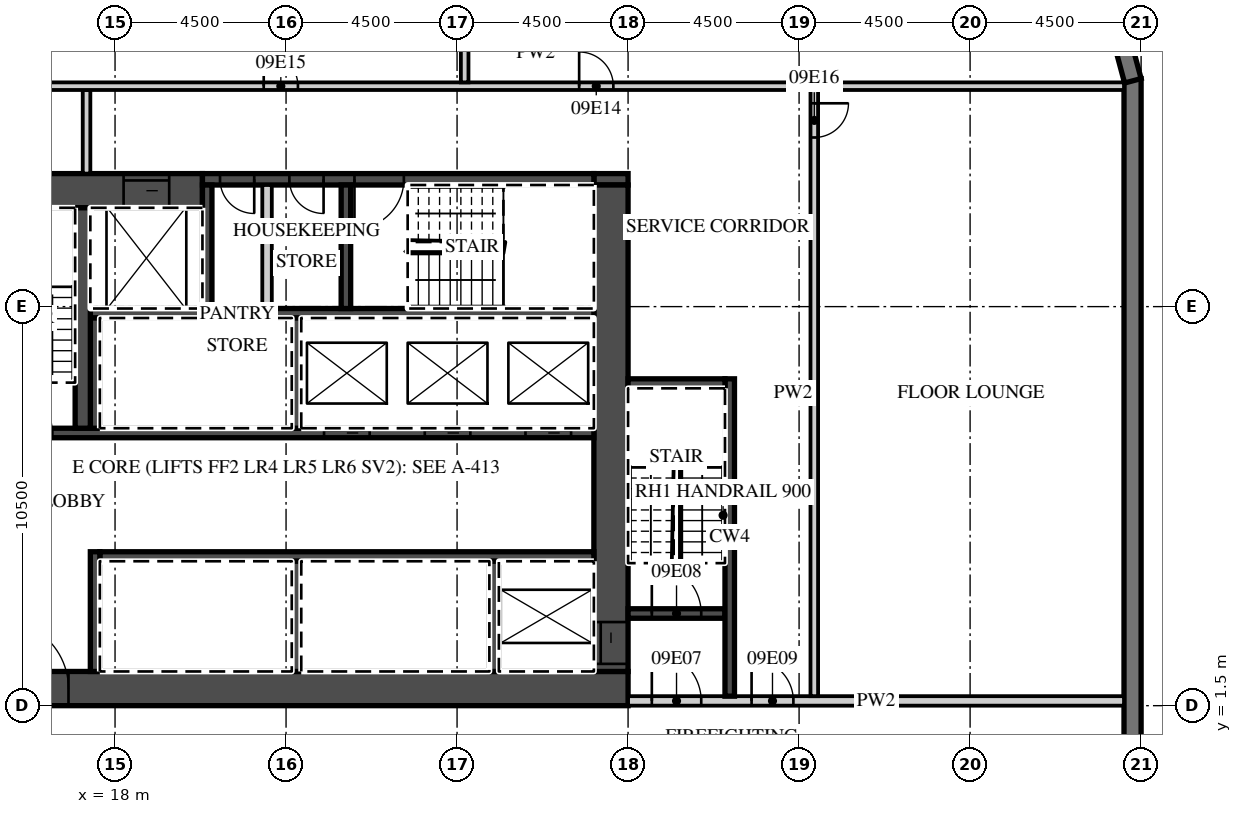
"""IFC4 building model, lengths in metres.
Left out: names, types, materials, properties, quantities, classifications, styles, units other than length and angle.
Written with IfcOpenShell. Run it as: python <this file> out.ifc"""

import sys

from ifc_helpers import new_model, si_unit, direction, frame, frame_2d, origin, place, context, subcontext, project, spatial, polyline, rectangle, outline, extrude, element, fill, save


model = new_model("IFC4")
c1 = context("Model", 3, precision=1e-05, world=origin(), true_north=direction((0.0, 1.0)))
c2 = subcontext(c1, "Body", "Model", "MODEL_VIEW")
j1 = project(units=[si_unit("LENGTHUNIT", "METRE"), si_unit("PLANEANGLEUNIT", "RADIAN")], contexts=[c1])
p1 = place(None, origin())
s1 = spatial("IfcSite", under=j1, at=p1, CompositionType="ELEMENT")
p2 = place(p1, origin())
s2 = spatial("IfcBuilding", under=s1, at=p2, CompositionType="ELEMENT")
p3 = place(p2, frame((0.0, 0.0, 60.0)))
s3 = spatial("IfcBuildingStorey", under=s2, at=p3, CompositionType="ELEMENT", Elevation=60.0)
p4 = place(p3, frame((44.775, -18.0, 0.0), z_axis=(0.0, 0.0, 1.0), x_axis=(0.0, 1.0, 0.0)))
e1 = element("IfcWall", 1, at=p4, inside=s3, PredefinedType="SOLIDWALL", context=c2, shape_type="SweptSolid", body=[
    extrude(rectangle(XDim=36.0, YDim=0.45, at=frame_2d((18.0, 0.0))), origin(), (0.0, 0.0, 1.0), 3.02),
])
p5 = place(p4, frame((3.9, 0.0, 0.45)))
e2 = element("IfcOpeningElement", 2, at=p5, cuts=e1, PredefinedType="OPENING", context=c2, shape_type="SweptSolid", body=[
    extrude(rectangle(XDim=3.3, YDim=2.25, at=frame_2d((1.65, 1.125))), frame((0.0, 0.235, 0.0), z_axis=(0.0, -1.0, 0.0), x_axis=(1.0, 0.0, 0.0)), (0.0, 0.0, 1.0), 0.47),
])
p6 = place(p4, frame((8.4, 0.0, 0.45)))
e3 = element("IfcOpeningElement", 3, at=p6, cuts=e1, PredefinedType="OPENING", context=c2, shape_type="SweptSolid", body=[
    extrude(rectangle(XDim=3.3, YDim=2.25, at=frame_2d((1.65, 1.125))), frame((0.0, 0.235, 0.0), z_axis=(0.0, -1.0, 0.0), x_axis=(1.0, 0.0, 0.0)), (0.0, 0.0, 1.0), 0.47),
])
p7 = place(p4, frame((12.9, 0.0, 0.45)))
e4 = element("IfcOpeningElement", 4, at=p7, cuts=e1, PredefinedType="OPENING", context=c2, shape_type="SweptSolid", body=[
    extrude(rectangle(XDim=3.3, YDim=2.25, at=frame_2d((1.65, 1.125))), frame((0.0, 0.235, 0.0), z_axis=(0.0, -1.0, 0.0), x_axis=(1.0, 0.0, 0.0)), (0.0, 0.0, 1.0), 0.47),
])
p8 = place(p3, frame((44.783, 17.942, 0.0), z_axis=(0.0, 0.0, 1.0), x_axis=(-0.25881466832, 0.965926999034, 0.0)))
e5 = element("IfcWall", 5, at=p8, inside=s3, PredefinedType="SOLIDWALL", context=c2, shape_type="SweptSolid", body=[
    extrude(outline(polyline([(0.0, -0.225), (2.071, -0.225), (1.95, 0.225), (0.121, 0.225), (0.0, -0.225)])), origin(), (0.0, 0.0, 1.0), 3.02),
])
p9 = place(p3, frame((13.5, 1.95, 0.0), z_axis=(0.0, 0.0, 1.0), x_axis=(1.0, 0.0, 0.0)))
e6 = element("IfcWall", 6, at=p9, inside=s3, PredefinedType="SHEAR", context=c2, shape_type="SweptSolid", body=[
    extrude(rectangle(XDim=18.0, YDim=0.9, at=frame_2d((9.0, 0.0))), origin(), (0.0, 0.0, 1.0), 3.02),
])
p10 = place(p9, frame((1.475, 0.0, 0.0)))
e7 = element("IfcOpeningElement", 7, at=p10, cuts=e6, PredefinedType="OPENING", context=c2, shape_type="SweptSolid", body=[
    extrude(rectangle(XDim=1.8, YDim=2.1, at=frame_2d((0.9, 1.05))), frame((0.0, 0.46, 0.0), z_axis=(0.0, -1.0, 0.0), x_axis=(1.0, 0.0, 0.0)), (0.0, 0.0, 1.0), 0.92),
])
p11 = place(p3, frame((13.5, 15.05, 0.0), z_axis=(0.0, 0.0, 1.0), x_axis=(1.0, 0.0, 0.0)))
e8 = element("IfcWall", 8, at=p11, inside=s3, PredefinedType="SHEAR", context=c2, shape_type="SweptSolid", body=[
    extrude(rectangle(XDim=6.8, YDim=0.9, at=frame_2d((3.4, 0.0))), origin(), (0.0, 0.0, 1.0), 3.02),
])
p12 = place(p11, frame((4.725, 0.0, 0.0)))
e9 = element("IfcOpeningElement", 9, at=p12, cuts=e8, PredefinedType="OPENING", context=c2, shape_type="SweptSolid", body=[
    extrude(rectangle(XDim=1.2, YDim=2.1, at=frame_2d((0.6, 1.05))), frame((0.0, 0.46, 0.0), z_axis=(0.0, -1.0, 0.0), x_axis=(1.0, 0.0, 0.0)), (0.0, 0.0, 1.0), 0.92),
])
p13 = place(p3, frame((30.6, 15.35, 0.0), z_axis=(0.0, 0.0, 1.0), x_axis=(1.0, 0.0, 0.0)))
e10 = element("IfcWall", 10, at=p13, inside=s3, PredefinedType="SHEAR", context=c2, shape_type="SweptSolid", body=[
    extrude(rectangle(XDim=0.9, YDim=0.3, at=frame_2d((0.45, 0.0))), origin(), (0.0, 0.0, 1.0), 3.02),
])
p14 = place(p3, frame((20.3, 15.35, 0.0), z_axis=(0.0, 0.0, 1.0), x_axis=(1.0, 0.0, 0.0)))
e11 = element("IfcWall", 11, at=p14, inside=s3, PredefinedType="SHEAR", context=c2, shape_type="SweptSolid", body=[
    extrude(rectangle(XDim=10.3, YDim=0.3, at=frame_2d((5.15, 0.0))), origin(), (0.0, 0.0, 1.0), 3.02),
])
p15 = place(p14, frame((4.0, 0.0, 0.0)))
e12 = element("IfcOpeningElement", 12, at=p15, cuts=e11, PredefinedType="OPENING", context=c2, shape_type="SweptSolid", body=[
    extrude(rectangle(XDim=1.3, YDim=2.1, at=frame_2d((0.65, 1.05))), frame((0.0, 0.16, 0.0), z_axis=(0.0, -1.0, 0.0), x_axis=(1.0, 0.0, 0.0)), (0.0, 0.0, 1.0), 0.32),
])
p16 = place(p14, frame((2.288, 0.0, 0.0)))
e13 = element("IfcOpeningElement", 13, at=p16, cuts=e11, PredefinedType="OPENING", context=c2, shape_type="SweptSolid", body=[
    extrude(rectangle(XDim=0.9, YDim=2.1, at=frame_2d((0.45, 1.05))), frame((0.0, 0.16, 0.0), z_axis=(0.0, -1.0, 0.0), x_axis=(1.0, 0.0, 0.0)), (0.0, 0.0, 1.0), 0.32),
])
p17 = place(p14, frame((0.462, 0.0, 0.0)))
e14 = element("IfcOpeningElement", 14, at=p17, cuts=e11, PredefinedType="OPENING", context=c2, shape_type="SweptSolid", body=[
    extrude(rectangle(XDim=0.9, YDim=2.1, at=frame_2d((0.45, 1.05))), frame((0.0, 0.16, 0.0), z_axis=(0.0, -1.0, 0.0), x_axis=(1.0, 0.0, 0.0)), (0.0, 0.0, 1.0), 0.32),
])
p18 = place(p3, frame((31.05, 2.4, 0.0), z_axis=(0.0, 0.0, 1.0), x_axis=(0.0, 1.0, 0.0)))
e15 = element("IfcWall", 15, at=p18, inside=s3, PredefinedType="SHEAR", context=c2, shape_type="SweptSolid", body=[
    extrude(rectangle(XDim=12.8, YDim=0.9, at=frame_2d((6.4, 0.0))), origin(), (0.0, 0.0, 1.0), 3.02),
])
p19 = place(p18, frame((0.2, 0.0, 0.0)))
e16 = element("IfcOpeningElement", 16, at=p19, cuts=e15, PredefinedType="OPENING", context=c2, shape_type="SweptSolid", body=[
    extrude(rectangle(XDim=1.1, YDim=2.1, at=frame_2d((0.55, 1.05))), frame((0.0, 0.46, 0.0), z_axis=(0.0, -1.0, 0.0), x_axis=(1.0, 0.0, 0.0)), (0.0, 0.0, 1.0), 0.92),
])
p20 = place(p3, frame((17.6, 5.425, 0.0), z_axis=(0.0, 0.0, 1.0), x_axis=(1.0, 0.0, 0.0)))
e17 = element("IfcWall", 17, at=p20, inside=s3, PredefinedType="SHEAR", context=c2, shape_type="SweptSolid", body=[
    extrude(rectangle(XDim=13.0, YDim=0.25, at=frame_2d((6.5, 0.0))), origin(), (0.0, 0.0, 1.0), 3.02),
])
p21 = place(p3, frame((17.475, 2.4, 0.0), z_axis=(0.0, 0.0, 1.0), x_axis=(0.0, 1.0, 0.0)))
e18 = element("IfcWall", 18, at=p21, inside=s3, PredefinedType="SHEAR", context=c2, shape_type="SweptSolid", body=[
    extrude(rectangle(XDim=3.15, YDim=0.25, at=frame_2d((1.575, 0.0))), origin(), (0.0, 0.0, 1.0), 3.02),
])
for number, where, z_axis, x_axis in (
    (19, (27.975, 2.4, 0.0), (0.0, 0.0, 1.0), (0.0, 1.0, 0.0)),
    (20, (22.775, 2.4, 0.0), (0.0, 0.0, 1.0), (0.0, 1.0, 0.0)),
):
    element("IfcWall", number, at=place(p3, frame(where, z_axis=z_axis, x_axis=x_axis)), inside=s3, PredefinedType="SHEAR", context=c2, shape_type="SweptSolid", body=[
        extrude(rectangle(XDim=2.9, YDim=0.25, at=frame_2d((1.45, 0.0))), origin(), (0.0, 0.0, 1.0), 3.02),
    ])
p22 = place(p3, frame((14.4, 8.675, 0.0), z_axis=(0.0, 0.0, 1.0), x_axis=(1.0, 0.0, 0.0)))
e21 = element("IfcWall", 21, at=p22, inside=s3, PredefinedType="SHEAR", context=c2, shape_type="SweptSolid", body=[
    extrude(rectangle(XDim=16.2, YDim=0.25, at=frame_2d((8.1, 0.0))), origin(), (0.0, 0.0, 1.0), 3.02),
])
p23 = place(p22, frame((14.4, 0.0, 0.0)))
e22 = element("IfcOpeningElement", 22, at=p23, cuts=e21, PredefinedType="OPENING", context=c2, shape_type="SweptSolid", body=[
    extrude(rectangle(XDim=1.2, YDim=2.1, at=frame_2d((0.6, 1.05))), frame((0.0, 0.135, 0.0), z_axis=(0.0, -1.0, 0.0), x_axis=(1.0, 0.0, 0.0)), (0.0, 0.0, 1.0), 0.27),
])
p24 = place(p22, frame((11.75, 0.0, 0.0)))
e23 = element("IfcOpeningElement", 23, at=p24, cuts=e21, PredefinedType="OPENING", context=c2, shape_type="SweptSolid", body=[
    extrude(rectangle(XDim=1.2, YDim=2.1, at=frame_2d((0.6, 1.05))), frame((0.0, 0.135, 0.0), z_axis=(0.0, -1.0, 0.0), x_axis=(1.0, 0.0, 0.0)), (0.0, 0.0, 1.0), 0.27),
])
p25 = place(p22, frame((9.1, 0.0, 0.0)))
e24 = element("IfcOpeningElement", 24, at=p25, cuts=e21, PredefinedType="OPENING", context=c2, shape_type="SweptSolid", body=[
    extrude(rectangle(XDim=1.2, YDim=2.1, at=frame_2d((0.6, 1.05))), frame((0.0, 0.135, 0.0), z_axis=(0.0, -1.0, 0.0), x_axis=(1.0, 0.0, 0.0)), (0.0, 0.0, 1.0), 0.27),
])
p26 = place(p22, frame((0.65, 0.0, 0.0)))
e25 = element("IfcOpeningElement", 25, at=p26, cuts=e21, PredefinedType="OPENING", context=c2, shape_type="SweptSolid", body=[
    extrude(rectangle(XDim=1.3, YDim=2.1, at=frame_2d((0.65, 1.05))), frame((0.0, 0.135, 0.0), z_axis=(0.0, -1.0, 0.0), x_axis=(1.0, 0.0, 0.0)), (0.0, 0.0, 1.0), 0.27),
])
p27 = place(p3, frame((17.35, 11.825, 0.0), z_axis=(0.0, 0.0, 1.0), x_axis=(1.0, 0.0, 0.0)))
e26 = element("IfcWall", 26, at=p27, inside=s3, PredefinedType="SHEAR", context=c2, shape_type="SweptSolid", body=[
    extrude(rectangle(XDim=13.25, YDim=0.25, at=frame_2d((6.625, 0.0))), origin(), (0.0, 0.0, 1.0), 3.02),
])
for number, where, z_axis, x_axis in (
    (27, (17.475, 8.8, 0.0), (0.0, 0.0, 1.0), (0.0, 1.0, 0.0)),
    (28, (22.775, 8.8, 0.0), (0.0, 0.0, 1.0), (0.0, 1.0, 0.0)),
):
    element("IfcWall", number, at=place(p3, frame(where, z_axis=z_axis, x_axis=x_axis)), inside=s3, PredefinedType="SHEAR", context=c2, shape_type="SweptSolid", body=[
        extrude(rectangle(XDim=2.9, YDim=0.25, at=frame_2d((1.45, 0.0))), origin(), (0.0, 0.0, 1.0), 3.02),
    ])
p28 = place(p3, frame((17.15, 8.8, 0.0), z_axis=(0.0, 0.0, 1.0), x_axis=(0.0, 1.0, 0.0)))
e29 = element("IfcWall", 29, at=p28, inside=s3, PredefinedType="SHEAR", context=c2, shape_type="SweptSolid", body=[
    extrude(rectangle(XDim=5.8, YDim=0.4, at=frame_2d((2.9, 0.0))), origin(), (0.0, 0.0, 1.0), 3.02),
])
for number, where, z_axis, x_axis in (
    (30, (20.425, 11.95, 0.0), (0.0, 0.0, 1.0), (0.0, 1.0, 0.0)),
    (31, (24.075, 11.95, 0.0), (0.0, 0.0, 1.0), (0.0, 1.0, 0.0)),
):
    element("IfcWall", number, at=place(p3, frame(where, z_axis=z_axis, x_axis=x_axis)), inside=s3, PredefinedType="SHEAR", context=c2, shape_type="SweptSolid", body=[
        extrude(rectangle(XDim=3.25, YDim=0.25, at=frame_2d((1.625, 0.0))), origin(), (0.0, 0.0, 1.0), 3.02),
    ])
p29 = place(p3, frame((22.0, 11.95, 0.0), z_axis=(0.0, 0.0, 1.0), x_axis=(0.0, 1.0, 0.0)))
e32 = element("IfcWall", 32, at=p29, inside=s3, PredefinedType="PARTITIONING", context=c2, shape_type="SweptSolid", body=[
    extrude(rectangle(XDim=3.25, YDim=0.25, at=frame_2d((1.625, 0.0))), origin(), (0.0, 0.0, 1.0), 3.02),
])
p30 = place(p3, frame((31.5, 1.625, 0.0), z_axis=(0.0, 0.0, 1.0), x_axis=(1.0, 0.0, 0.0)))
e33 = element("IfcWall", 33, at=p30, inside=s3, PredefinedType="PARTITIONING", context=c2, shape_type="SweptSolid", body=[
    extrude(rectangle(XDim=13.05, YDim=0.25, at=frame_2d((6.525, 0.0))), origin(), (0.0, 0.0, 1.0), 3.02),
])
p31 = place(p30, frame((0.625, 0.0, 0.0)))
e34 = element("IfcOpeningElement", 34, at=p31, cuts=e33, PredefinedType="OPENING", context=c2, shape_type="SweptSolid", body=[
    extrude(rectangle(XDim=1.3, YDim=2.1, at=frame_2d((0.65, 1.05))), frame((0.0, 0.135, 0.0), z_axis=(0.0, -1.0, 0.0), x_axis=(1.0, 0.0, 0.0)), (0.0, 0.0, 1.0), 0.27),
])
p32 = place(p30, frame((3.25, 0.0, 0.0)))
e35 = element("IfcOpeningElement", 35, at=p32, cuts=e33, PredefinedType="OPENING", context=c2, shape_type="SweptSolid", body=[
    extrude(rectangle(XDim=1.1, YDim=2.1, at=frame_2d((0.55, 1.05))), frame((0.0, 0.135, 0.0), z_axis=(0.0, -1.0, 0.0), x_axis=(1.0, 0.0, 0.0)), (0.0, 0.0, 1.0), 0.27),
])
p33 = place(p3, frame((31.5, 3.925, 0.0), z_axis=(0.0, 0.0, 1.0), x_axis=(1.0, 0.0, 0.0)))
e36 = element("IfcWall", 36, at=p33, inside=s3, PredefinedType="SHEAR", context=c2, shape_type="SweptSolid", body=[
    extrude(rectangle(XDim=2.55, YDim=0.25, at=frame_2d((1.275, 0.0))), origin(), (0.0, 0.0, 1.0), 3.02),
])
p34 = place(p33, frame((0.625, 0.0, 0.0)))
e37 = element("IfcOpeningElement", 37, at=p34, cuts=e36, PredefinedType="OPENING", context=c2, shape_type="SweptSolid", body=[
    extrude(rectangle(XDim=1.3, YDim=2.1, at=frame_2d((0.65, 1.05))), frame((0.0, 0.135, 0.0), z_axis=(0.0, -1.0, 0.0), x_axis=(1.0, 0.0, 0.0)), (0.0, 0.0, 1.0), 0.27),
])
p35 = place(p3, frame((34.175, 1.75, 0.0), z_axis=(0.0, 0.0, 1.0), x_axis=(0.0, 1.0, 0.0)))
e38 = element("IfcWall", 38, at=p35, inside=s3, PredefinedType="SHEAR", context=c2, shape_type="SweptSolid", body=[
    extrude(rectangle(XDim=8.35, YDim=0.25, at=frame_2d((4.175, 0.0))), origin(), (0.0, 0.0, 1.0), 3.02),
])
p36 = place(p3, frame((31.5, 9.975, 0.0), z_axis=(0.0, 0.0, 1.0), x_axis=(1.0, 0.0, 0.0)))
e39 = element("IfcWall", 39, at=p36, inside=s3, PredefinedType="SHEAR", context=c2, shape_type="SweptSolid", body=[
    extrude(rectangle(XDim=2.55, YDim=0.25, at=frame_2d((1.275, 0.0))), origin(), (0.0, 0.0, 1.0), 3.02),
])
p37 = place(p3, frame((17.25, 15.5, 0.0), z_axis=(0.0, 0.0, 1.0), x_axis=(0.0, 1.0, 0.0)))
e40 = element("IfcWall", 40, at=p37, inside=s3, PredefinedType="PARTITIONING", context=c2, shape_type="SweptSolid", body=[
    extrude(rectangle(XDim=2.2, YDim=0.2, at=frame_2d((1.1, 0.0))), origin(), (0.0, 0.0, 1.0), 3.02),
])
p38 = place(p3, frame((36.4, 1.75, 0.0), z_axis=(0.0, 0.0, 1.0), x_axis=(0.0, 1.0, 0.0)))
e41 = element("IfcWall", 41, at=p38, inside=s3, PredefinedType="PARTITIONING", context=c2, shape_type="SweptSolid", body=[
    extrude(rectangle(XDim=15.95, YDim=0.2, at=frame_2d((7.975, 0.0))), origin(), (0.0, 0.0, 1.0), 3.02),
])
p39 = place(p38, frame((14.7, 0.0, 0.0)))
e42 = element("IfcOpeningElement", 42, at=p39, cuts=e41, PredefinedType="OPENING", context=c2, shape_type="SweptSolid", body=[
    extrude(rectangle(XDim=0.9, YDim=2.1, at=frame_2d((0.45, 1.05))), frame((0.0, 0.11, 0.0), z_axis=(0.0, -1.0, 0.0), x_axis=(1.0, 0.0, 0.0)), (0.0, 0.0, 1.0), 0.22),
])
p40 = place(p3, frame((13.6, 17.8, 0.0), z_axis=(0.0, 0.0, 1.0), x_axis=(1.0, 0.0, 0.0)))
e43 = element("IfcWall", 43, at=p40, inside=s3, PredefinedType="PARTITIONING", context=c2, shape_type="SweptSolid", body=[
    extrude(rectangle(XDim=30.95, YDim=0.2, at=frame_2d((15.475, 0.0))), origin(), (0.0, 0.0, 1.0), 3.02),
])
p41 = place(p40, frame((16.613, 0.0, 0.0)))
e44 = element("IfcOpeningElement", 44, at=p41, cuts=e43, PredefinedType="OPENING", context=c2, shape_type="SweptSolid", body=[
    extrude(rectangle(XDim=0.9, YDim=2.1, at=frame_2d((0.45, 1.05))), frame((0.0, 0.11, 0.0), z_axis=(0.0, -1.0, 0.0), x_axis=(1.0, 0.0, 0.0)), (0.0, 0.0, 1.0), 0.22),
])
p42 = place(p40, frame((8.312, 0.0, 0.0)))
e45 = element("IfcOpeningElement", 45, at=p42, cuts=e43, PredefinedType="OPENING", context=c2, shape_type="SweptSolid", body=[
    extrude(rectangle(XDim=0.9, YDim=2.1, at=frame_2d((0.45, 1.05))), frame((0.0, 0.11, 0.0), z_axis=(0.0, -1.0, 0.0), x_axis=(1.0, 0.0, 0.0)), (0.0, 0.0, 1.0), 0.22),
])
p43 = place(p3, frame((27.2, 17.9, 0.0), z_axis=(0.0, 0.0, 1.0), x_axis=(0.0, 1.0, 0.0)))
e46 = element("IfcWall", 46, at=p43, inside=s3, PredefinedType="PARTITIONING", context=c2, shape_type="SweptSolid", body=[
    extrude(rectangle(XDim=3.65, YDim=0.2, at=frame_2d((1.825, 0.0))), origin(), (0.0, 0.0, 1.0), 3.02),
])
p44 = place(p23, origin())
e47 = element("IfcDoor", 47, at=p44, inside=s3, OperationType="SLIDING_TO_LEFT", PredefinedType="DOOR", context=c2, shape_type="SweptSolid", body=[
    extrude(rectangle(XDim=1.2, YDim=2.1, at=frame_2d((0.6, 1.05))), frame((0.0, 0.025, 0.0), z_axis=(0.0, -1.0, 0.0), x_axis=(1.0, 0.0, 0.0)), (0.0, 0.0, 1.0), 0.05),
])
fill(e22, e47)
p45 = place(p24, origin())
e48 = element("IfcDoor", 48, at=p45, inside=s3, OperationType="SLIDING_TO_RIGHT", PredefinedType="DOOR", context=c2, shape_type="SweptSolid", body=[
    extrude(rectangle(XDim=1.2, YDim=2.1, at=frame_2d((0.6, 1.05))), frame((0.0, 0.025, 0.0), z_axis=(0.0, -1.0, 0.0), x_axis=(1.0, 0.0, 0.0)), (0.0, 0.0, 1.0), 0.05),
])
fill(e23, e48)
p46 = place(p25, origin())
e49 = element("IfcDoor", 49, at=p46, inside=s3, OperationType="SLIDING_TO_RIGHT", PredefinedType="DOOR", context=c2, shape_type="SweptSolid", body=[
    extrude(rectangle(XDim=1.2, YDim=2.1, at=frame_2d((0.6, 1.05))), frame((0.0, 0.025, 0.0), z_axis=(0.0, -1.0, 0.0), x_axis=(1.0, 0.0, 0.0)), (0.0, 0.0, 1.0), 0.05),
])
fill(e24, e49)
p47 = place(p12, origin())
e50 = element("IfcDoor", 50, at=p47, inside=s3, OperationType="SLIDING_TO_LEFT", PredefinedType="DOOR", context=c2, shape_type="SweptSolid", body=[
    extrude(rectangle(XDim=1.2, YDim=2.1, at=frame_2d((0.6, 1.05))), frame((0.0, 0.025, 0.0), z_axis=(0.0, -1.0, 0.0), x_axis=(1.0, 0.0, 0.0)), (0.0, 0.0, 1.0), 0.05),
])
fill(e9, e50)
p48 = place(p19, origin())
e51 = element("IfcDoor", 51, at=p48, inside=s3, OperationType="SLIDING_TO_LEFT", PredefinedType="DOOR", context=c2, shape_type="SweptSolid", body=[
    extrude(rectangle(XDim=1.1, YDim=2.1, at=frame_2d((0.55, 1.05))), frame((0.0, 0.025, 0.0), z_axis=(0.0, -1.0, 0.0), x_axis=(1.0, 0.0, 0.0)), (0.0, 0.0, 1.0), 0.05),
])
fill(e16, e51)
p49 = place(p10, origin())
e52 = element("IfcDoor", 52, at=p49, inside=s3, OperationType="DOUBLE_DOOR_DOUBLE_SWING", PredefinedType="DOOR", context=c2, shape_type="SweptSolid", body=[
    extrude(rectangle(XDim=1.8, YDim=2.1, at=frame_2d((0.9, 1.05))), frame((0.0, 0.025, 0.0), z_axis=(0.0, -1.0, 0.0), x_axis=(1.0, 0.0, 0.0)), (0.0, 0.0, 1.0), 0.05),
])
fill(e7, e52)
p50 = place(p31, origin())
e53 = element("IfcDoor", 53, at=p50, inside=s3, OperationType="SINGLE_SWING_LEFT", PredefinedType="DOOR", context=c2, shape_type="SweptSolid", body=[
    extrude(rectangle(XDim=1.3, YDim=2.1, at=frame_2d((0.65, 1.05))), frame((0.0, 0.025, 0.0), z_axis=(0.0, -1.0, 0.0), x_axis=(1.0, 0.0, 0.0)), (0.0, 0.0, 1.0), 0.05),
])
fill(e34, e53)
p51 = place(p34, origin())
e54 = element("IfcDoor", 54, at=p51, inside=s3, OperationType="SINGLE_SWING_LEFT", PredefinedType="DOOR", context=c2, shape_type="SweptSolid", body=[
    extrude(rectangle(XDim=1.3, YDim=2.1, at=frame_2d((0.65, 1.05))), frame((0.0, 0.025, 0.0), z_axis=(0.0, -1.0, 0.0), x_axis=(1.0, 0.0, 0.0)), (0.0, 0.0, 1.0), 0.05),
])
fill(e37, e54)
p52 = place(p32, origin())
e55 = element("IfcDoor", 55, at=p52, inside=s3, OperationType="SINGLE_SWING_LEFT", PredefinedType="DOOR", context=c2, shape_type="SweptSolid", body=[
    extrude(rectangle(XDim=1.1, YDim=2.1, at=frame_2d((0.55, 1.05))), frame((0.0, 0.025, 0.0), z_axis=(0.0, -1.0, 0.0), x_axis=(1.0, 0.0, 0.0)), (0.0, 0.0, 1.0), 0.05),
])
fill(e35, e55)
p53 = place(p15, origin())
e56 = element("IfcDoor", 56, at=p53, inside=s3, OperationType="SINGLE_SWING_LEFT", PredefinedType="DOOR", context=c2, shape_type="SweptSolid", body=[
    extrude(rectangle(XDim=1.3, YDim=2.1, at=frame_2d((0.65, 1.05))), frame((0.0, 0.025, 0.0), z_axis=(0.0, -1.0, 0.0), x_axis=(1.0, 0.0, 0.0)), (0.0, 0.0, 1.0), 0.05),
])
fill(e12, e56)
p54 = place(p16, origin())
e57 = element("IfcDoor", 57, at=p54, inside=s3, OperationType="SINGLE_SWING_RIGHT", PredefinedType="DOOR", context=c2, shape_type="SweptSolid", body=[
    extrude(rectangle(XDim=0.9, YDim=2.1, at=frame_2d((0.45, 1.05))), frame((0.0, 0.025, 0.0), z_axis=(0.0, -1.0, 0.0), x_axis=(1.0, 0.0, 0.0)), (0.0, 0.0, 1.0), 0.05),
])
fill(e13, e57)
p55 = place(p17, origin())
e58 = element("IfcDoor", 58, at=p55, inside=s3, OperationType="SINGLE_SWING_RIGHT", PredefinedType="DOOR", context=c2, shape_type="SweptSolid", body=[
    extrude(rectangle(XDim=0.9, YDim=2.1, at=frame_2d((0.45, 1.05))), frame((0.0, 0.025, 0.0), z_axis=(0.0, -1.0, 0.0), x_axis=(1.0, 0.0, 0.0)), (0.0, 0.0, 1.0), 0.05),
])
fill(e14, e58)
p56 = place(p41, origin())
e59 = element("IfcDoor", 59, at=p56, inside=s3, OperationType="SINGLE_SWING_LEFT", PredefinedType="DOOR", context=c2, shape_type="SweptSolid", body=[
    extrude(rectangle(XDim=0.9, YDim=2.1, at=frame_2d((0.45, 1.05))), frame((0.0, 0.025, 0.0), z_axis=(0.0, -1.0, 0.0), x_axis=(1.0, 0.0, 0.0)), (0.0, 0.0, 1.0), 0.05),
])
fill(e44, e59)
p57 = place(p42, origin())
e60 = element("IfcDoor", 60, at=p57, inside=s3, OperationType="SINGLE_SWING_LEFT", PredefinedType="DOOR", context=c2, shape_type="SweptSolid", body=[
    extrude(rectangle(XDim=0.9, YDim=2.1, at=frame_2d((0.45, 1.05))), frame((0.0, 0.025, 0.0), z_axis=(0.0, -1.0, 0.0), x_axis=(1.0, 0.0, 0.0)), (0.0, 0.0, 1.0), 0.05),
])
fill(e45, e60)
p58 = place(p39, origin())
e61 = element("IfcDoor", 61, at=p58, inside=s3, OperationType="SINGLE_SWING_RIGHT", PredefinedType="DOOR", context=c2, shape_type="SweptSolid", body=[
    extrude(rectangle(XDim=0.9, YDim=2.1, at=frame_2d((0.45, 1.05))), frame((0.0, 0.025, 0.0), z_axis=(0.0, -1.0, 0.0), x_axis=(1.0, 0.0, 0.0)), (0.0, 0.0, 1.0), 0.05),
])
fill(e42, e61)
save(model, sys.argv[1])
